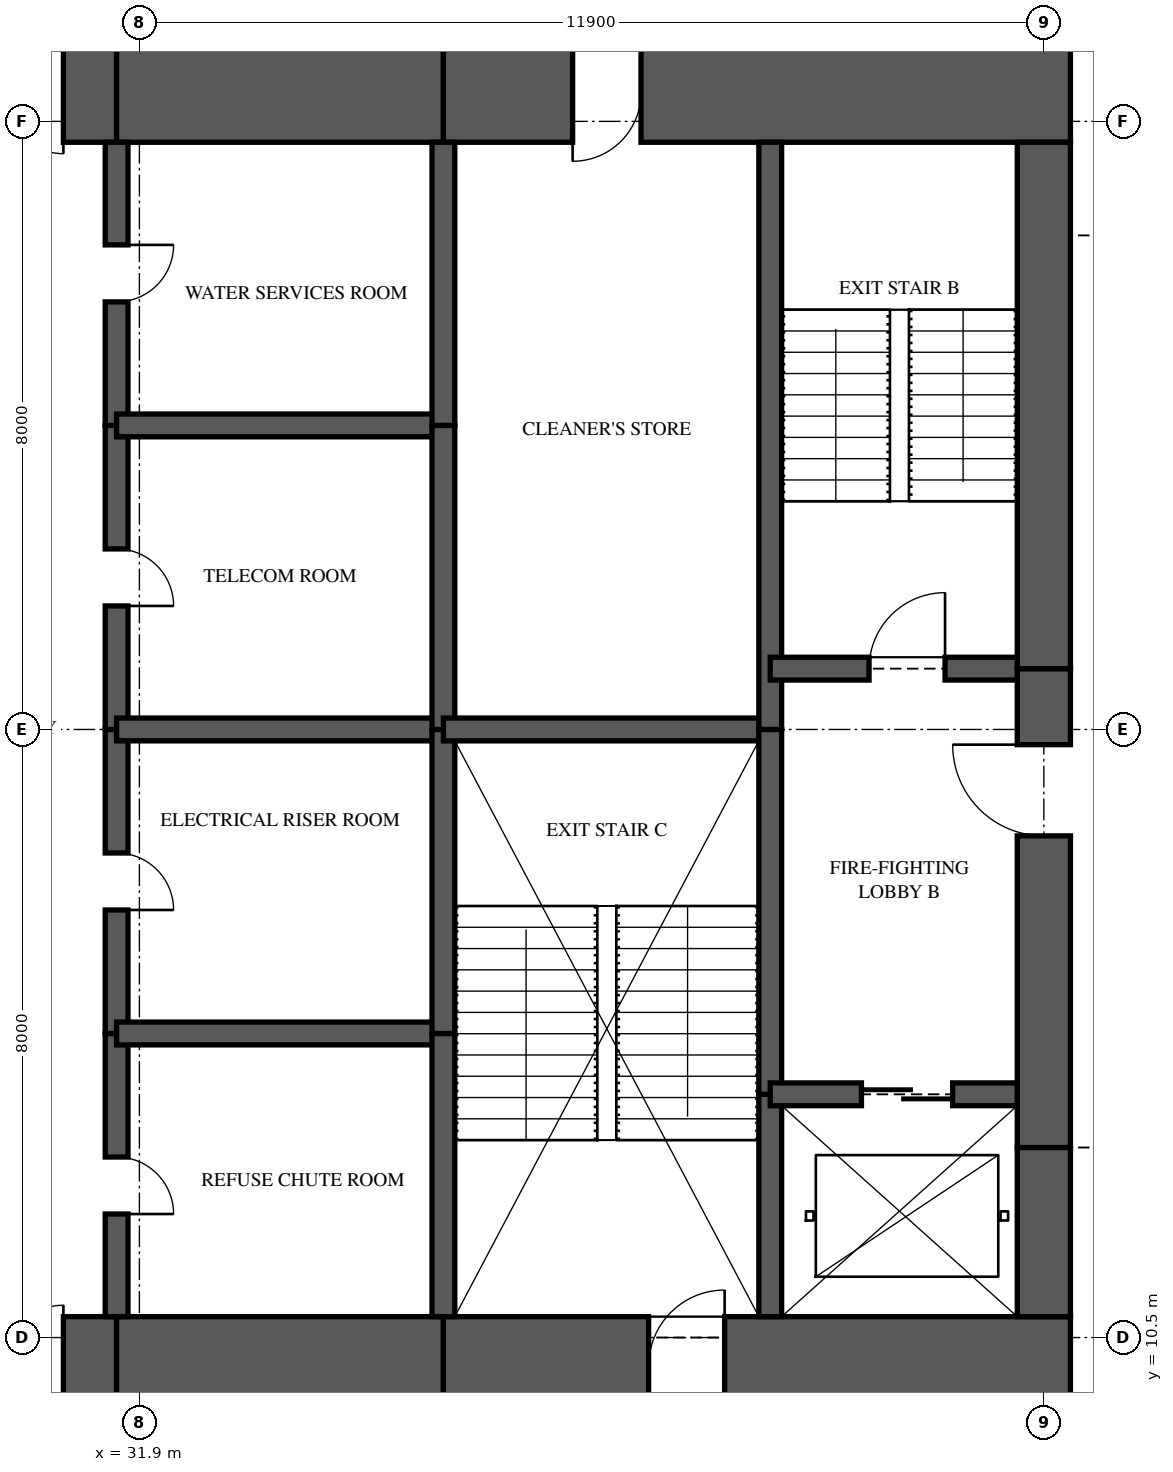
"""IFC4 building model, lengths in metres.
Left out: names, types, materials, properties, quantities, classifications, styles, units other than length and angle.
Written with IfcOpenShell. Run it as: python <this file> out.ifc"""

import sys

from ifc_helpers import new_model, si_unit, direction, frame, frame_2d, origin, place, context, subcontext, project, spatial, rectangle, extrude, element, fill, save


model = new_model("IFC4")
c1 = context("Model", 3, precision=1e-05, world=origin(), true_north=direction((0.0, 1.0)))
c2 = subcontext(c1, "Body", "Model", "MODEL_VIEW")
j1 = project(units=[si_unit("LENGTHUNIT", "METRE"), si_unit("PLANEANGLEUNIT", "RADIAN")], contexts=[c1])
p1 = place(None, origin())
s1 = spatial("IfcSite", under=j1, at=p1, CompositionType="ELEMENT")
p2 = place(p1, origin())
s2 = spatial("IfcBuilding", under=s1, at=p2, CompositionType="ELEMENT")
p3 = place(p2, frame((0.0, 0.0, 171.1)))
s3 = spatial("IfcBuildingStorey", under=s2, at=p3, CompositionType="ELEMENT", Elevation=171.1)
p4 = place(p3, frame((26.0, 10.125, 0.0), z_axis=(0.0, 0.0, 1.0), x_axis=(1.0, 0.0, 0.0)))
e1 = element("IfcWall", 1, at=p4, inside=s3, PredefinedType="SHEAR", context=c2, shape_type="SweptSolid", body=[
    extrude(rectangle(XDim=5.6, YDim=1.3, at=frame_2d((2.8, 0.0))), origin(), (0.0, 0.0, 1.0), 3.35),
])
p5 = place(p4, frame((3.3, 0.0, 0.0)))
e2 = element("IfcOpeningElement", 2, at=p5, cuts=e1, PredefinedType="OPENING", context=c2, shape_type="SweptSolid", body=[
    extrude(rectangle(XDim=1.6, YDim=2.1, at=frame_2d((0.8, 1.05))), frame((0.0, 0.66, 0.0), z_axis=(0.0, -1.0, 0.0), x_axis=(1.0, 0.0, 0.0)), (0.0, 0.0, 1.0), 1.32),
])
p6 = place(p3, frame((31.6, 10.125, 0.0), z_axis=(0.0, 0.0, 1.0), x_axis=(1.0, 0.0, 0.0)))
e3 = element("IfcWall", 3, at=p6, inside=s3, PredefinedType="SHEAR", context=c2, shape_type="SweptSolid", body=[
    extrude(rectangle(XDim=4.3, YDim=1.3, at=frame_2d((2.15, 0.0))), origin(), (0.0, 0.0, 1.0), 3.35),
])
p7 = place(p3, frame((35.9, 10.125, 0.0), z_axis=(0.0, 0.0, 1.0), x_axis=(1.0, 0.0, 0.0)))
e4 = element("IfcWall", 4, at=p7, inside=s3, PredefinedType="SHEAR", context=c2, shape_type="SweptSolid", body=[
    extrude(rectangle(XDim=8.25, YDim=1.3, at=frame_2d((4.125, 0.0))), origin(), (0.0, 0.0, 1.0), 3.35),
])
p8 = place(p7, frame((2.7, 0.0, 0.0)))
e5 = element("IfcOpeningElement", 5, at=p8, cuts=e4, PredefinedType="OPENING", context=c2, shape_type="SweptSolid", body=[
    extrude(rectangle(XDim=1.0, YDim=2.1, at=frame_2d((0.5, 1.05))), frame((0.0, 0.66, 0.0), z_axis=(0.0, -1.0, 0.0), x_axis=(1.0, 0.0, 0.0)), (0.0, 0.0, 1.0), 1.32),
])
p9 = place(p3, frame((44.15, 26.875, 0.0), z_axis=(0.0, 0.0, 1.0), x_axis=(-1.0, 0.0, 0.0)))
e6 = element("IfcWall", 6, at=p9, inside=s3, PredefinedType="SHEAR", context=c2, shape_type="SweptSolid", body=[
    extrude(rectangle(XDim=8.25, YDim=1.3, at=frame_2d((4.125, 0.0))), origin(), (0.0, 0.0, 1.0), 3.35),
])
p10 = place(p9, frame((5.65, 0.0, 0.0)))
e7 = element("IfcOpeningElement", 7, at=p10, cuts=e6, PredefinedType="OPENING", context=c2, shape_type="SweptSolid", body=[
    extrude(rectangle(XDim=0.9, YDim=2.1, at=frame_2d((0.45, 1.05))), frame((0.0, 0.66, 0.0), z_axis=(0.0, -1.0, 0.0), x_axis=(1.0, 0.0, 0.0)), (0.0, 0.0, 1.0), 1.32),
])
p11 = place(p3, frame((35.9, 26.875, 0.0), z_axis=(0.0, 0.0, 1.0), x_axis=(-1.0, 0.0, 0.0)))
e8 = element("IfcWall", 8, at=p11, inside=s3, PredefinedType="SHEAR", context=c2, shape_type="SweptSolid", body=[
    extrude(rectangle(XDim=4.3, YDim=1.3, at=frame_2d((2.15, 0.0))), origin(), (0.0, 0.0, 1.0), 3.35),
])
p12 = place(p3, frame((31.6, 26.875, 0.0), z_axis=(0.0, 0.0, 1.0), x_axis=(-1.0, 0.0, 0.0)))
e9 = element("IfcWall", 9, at=p12, inside=s3, PredefinedType="SHEAR", context=c2, shape_type="SweptSolid", body=[
    extrude(rectangle(XDim=5.6, YDim=1.3, at=frame_2d((2.8, 0.0))), origin(), (0.0, 0.0, 1.0), 3.35),
])
p13 = place(p12, frame((0.7, 0.0, 0.0)))
e10 = element("IfcOpeningElement", 10, at=p13, cuts=e9, PredefinedType="OPENING", context=c2, shape_type="SweptSolid", body=[
    extrude(rectangle(XDim=1.6, YDim=2.1, at=frame_2d((0.8, 1.05))), frame((0.0, 0.66, 0.0), z_axis=(0.0, -1.0, 0.0), x_axis=(1.0, 0.0, 0.0)), (0.0, 0.0, 1.0), 1.32),
])
p14 = place(p3, frame((43.8, 10.775, 0.0), z_axis=(0.0, 0.0, 1.0), x_axis=(0.0, 1.0, 0.0)))
e11 = element("IfcWall", 11, at=p14, inside=s3, PredefinedType="SHEAR", context=c2, shape_type="SweptSolid", body=[
    extrude(rectangle(XDim=2.225, YDim=0.7, at=frame_2d((1.113, 0.0))), origin(), (0.0, 0.0, 1.0), 3.35),
])
p15 = place(p3, frame((43.8, 13.0, 0.0), z_axis=(0.0, 0.0, 1.0), x_axis=(0.0, 1.0, 0.0)))
e12 = element("IfcWall", 12, at=p15, inside=s3, PredefinedType="SHEAR", context=c2, shape_type="SweptSolid", body=[
    extrude(rectangle(XDim=6.3, YDim=0.7, at=frame_2d((3.15, 0.0))), origin(), (0.0, 0.0, 1.0), 3.35),
])
p16 = place(p15, frame((4.1, 0.0, 0.0)))
e13 = element("IfcOpeningElement", 13, at=p16, cuts=e12, PredefinedType="OPENING", context=c2, shape_type="SweptSolid", body=[
    extrude(rectangle(XDim=1.2, YDim=2.2, at=frame_2d((0.6, 1.1))), frame((0.0, 0.36, 0.0), z_axis=(0.0, -1.0, 0.0), x_axis=(1.0, 0.0, 0.0)), (0.0, 0.0, 1.0), 0.72),
])
p17 = place(p3, frame((43.8, 19.3, 0.0), z_axis=(0.0, 0.0, 1.0), x_axis=(0.0, 1.0, 0.0)))
e14 = element("IfcWall", 14, at=p17, inside=s3, PredefinedType="SHEAR", context=c2, shape_type="SweptSolid", body=[
    extrude(rectangle(XDim=6.925, YDim=0.7, at=frame_2d((3.462, 0.0))), origin(), (0.0, 0.0, 1.0), 3.35),
])
p18 = place(p3, frame((31.6, 10.775, 0.0), z_axis=(0.0, 0.0, 1.0), x_axis=(0.0, 1.0, 0.0)))
e15 = element("IfcWall", 15, at=p18, inside=s3, PredefinedType="SHEAR", context=c2, shape_type="SweptSolid", body=[
    extrude(rectangle(XDim=3.725, YDim=0.3, at=frame_2d((1.863, 0.0))), origin(), (0.0, 0.0, 1.0), 3.35),
])
p19 = place(p18, frame((1.35, 0.0, 0.0)))
e16 = element("IfcOpeningElement", 16, at=p19, cuts=e15, PredefinedType="OPENING", context=c2, shape_type="SweptSolid", body=[
    extrude(rectangle(XDim=0.75, YDim=2.1, at=frame_2d((0.375, 1.05))), frame((0.0, 0.16, 0.0), z_axis=(0.0, -1.0, 0.0), x_axis=(1.0, 0.0, 0.0)), (0.0, 0.0, 1.0), 0.32),
])
p20 = place(p3, frame((31.6, 14.5, 0.0), z_axis=(0.0, 0.0, 1.0), x_axis=(0.0, 1.0, 0.0)))
e17 = element("IfcWall", 17, at=p20, inside=s3, PredefinedType="SHEAR", context=c2, shape_type="SweptSolid", body=[
    extrude(rectangle(XDim=4.0, YDim=0.3, at=frame_2d((2.0, 0.0))), origin(), (0.0, 0.0, 1.0), 3.35),
])
p21 = place(p20, frame((1.625, 0.0, 0.0)))
e18 = element("IfcOpeningElement", 18, at=p21, cuts=e17, PredefinedType="OPENING", context=c2, shape_type="SweptSolid", body=[
    extrude(rectangle(XDim=0.75, YDim=2.1, at=frame_2d((0.375, 1.05))), frame((0.0, 0.16, 0.0), z_axis=(0.0, -1.0, 0.0), x_axis=(1.0, 0.0, 0.0)), (0.0, 0.0, 1.0), 0.32),
])
p22 = place(p3, frame((31.6, 18.5, 0.0), z_axis=(0.0, 0.0, 1.0), x_axis=(0.0, 1.0, 0.0)))
e19 = element("IfcWall", 19, at=p22, inside=s3, PredefinedType="SHEAR", context=c2, shape_type="SweptSolid", body=[
    extrude(rectangle(XDim=4.0, YDim=0.3, at=frame_2d((2.0, 0.0))), origin(), (0.0, 0.0, 1.0), 3.35),
])
p23 = place(p22, frame((1.625, 0.0, 0.0)))
e20 = element("IfcOpeningElement", 20, at=p23, cuts=e19, PredefinedType="OPENING", context=c2, shape_type="SweptSolid", body=[
    extrude(rectangle(XDim=0.75, YDim=2.1, at=frame_2d((0.375, 1.05))), frame((0.0, 0.16, 0.0), z_axis=(0.0, -1.0, 0.0), x_axis=(1.0, 0.0, 0.0)), (0.0, 0.0, 1.0), 0.32),
])
p24 = place(p3, frame((31.6, 22.5, 0.0), z_axis=(0.0, 0.0, 1.0), x_axis=(0.0, 1.0, 0.0)))
e21 = element("IfcWall", 21, at=p24, inside=s3, PredefinedType="SHEAR", context=c2, shape_type="SweptSolid", body=[
    extrude(rectangle(XDim=3.725, YDim=0.3, at=frame_2d((1.863, 0.0))), origin(), (0.0, 0.0, 1.0), 3.35),
])
p25 = place(p24, frame((1.625, 0.0, 0.0)))
e22 = element("IfcOpeningElement", 22, at=p25, cuts=e21, PredefinedType="OPENING", context=c2, shape_type="SweptSolid", body=[
    extrude(rectangle(XDim=0.75, YDim=2.1, at=frame_2d((0.375, 1.05))), frame((0.0, 0.16, 0.0), z_axis=(0.0, -1.0, 0.0), x_axis=(1.0, 0.0, 0.0)), (0.0, 0.0, 1.0), 0.32),
])
p26 = place(p3, frame((35.9, 10.775, 0.0), z_axis=(0.0, 0.0, 1.0), x_axis=(0.0, 1.0, 0.0)))
e23 = element("IfcWall", 23, at=p26, inside=s3, PredefinedType="SHEAR", context=c2, shape_type="SweptSolid", body=[
    extrude(rectangle(XDim=3.725, YDim=0.3, at=frame_2d((1.863, 0.0))), origin(), (0.0, 0.0, 1.0), 3.35),
])
for number, where, z_axis, x_axis in (
    (24, (35.9, 14.5, 0.0), (0.0, 0.0, 1.0), (0.0, 1.0, 0.0)),
    (25, (35.9, 18.5, 0.0), (0.0, 0.0, 1.0), (0.0, 1.0, 0.0)),
):
    element("IfcWall", number, at=place(p3, frame(where, z_axis=z_axis, x_axis=x_axis)), inside=s3, PredefinedType="SHEAR", context=c2, shape_type="SweptSolid", body=[
        extrude(rectangle(XDim=4.0, YDim=0.3, at=frame_2d((2.0, 0.0))), origin(), (0.0, 0.0, 1.0), 3.35),
    ])
p27 = place(p3, frame((35.9, 22.5, 0.0), z_axis=(0.0, 0.0, 1.0), x_axis=(0.0, 1.0, 0.0)))
e26 = element("IfcWall", 26, at=p27, inside=s3, PredefinedType="SHEAR", context=c2, shape_type="SweptSolid", body=[
    extrude(rectangle(XDim=3.725, YDim=0.3, at=frame_2d((1.863, 0.0))), origin(), (0.0, 0.0, 1.0), 3.35),
])
p28 = place(p3, frame((40.2, 10.775, 0.0), z_axis=(0.0, 0.0, 1.0), x_axis=(0.0, 1.0, 0.0)))
e27 = element("IfcWall", 27, at=p28, inside=s3, PredefinedType="SHEAR", context=c2, shape_type="SweptSolid", body=[
    extrude(rectangle(XDim=2.925, YDim=0.3, at=frame_2d((1.462, 0.0))), origin(), (0.0, 0.0, 1.0), 3.35),
])
p29 = place(p3, frame((40.2, 13.7, 0.0), z_axis=(0.0, 0.0, 1.0), x_axis=(0.0, 1.0, 0.0)))
e28 = element("IfcWall", 28, at=p29, inside=s3, PredefinedType="SHEAR", context=c2, shape_type="SweptSolid", body=[
    extrude(rectangle(XDim=4.8, YDim=0.3, at=frame_2d((2.4, 0.0))), origin(), (0.0, 0.0, 1.0), 3.35),
])
p30 = place(p3, frame((40.2, 18.5, 0.0), z_axis=(0.0, 0.0, 1.0), x_axis=(0.0, 1.0, 0.0)))
e29 = element("IfcWall", 29, at=p30, inside=s3, PredefinedType="SHEAR", context=c2, shape_type="SweptSolid", body=[
    extrude(rectangle(XDim=7.725, YDim=0.3, at=frame_2d((3.863, 0.0))), origin(), (0.0, 0.0, 1.0), 3.35),
])
for number, where, z_axis, x_axis in (
    (30, (31.6, 14.5, 0.0), (0.0, 0.0, 1.0), (1.0, 0.0, 0.0)),
    (31, (31.6, 18.5, 0.0), (0.0, 0.0, 1.0), (1.0, 0.0, 0.0)),
    (32, (31.6, 22.5, 0.0), (0.0, 0.0, 1.0), (1.0, 0.0, 0.0)),
):
    element("IfcWall", number, at=place(p3, frame(where, z_axis=z_axis, x_axis=x_axis)), inside=s3, PredefinedType="SHEAR", context=c2, shape_type="SweptSolid", body=[
        extrude(rectangle(XDim=4.3, YDim=0.3, at=frame_2d((2.15, 0.0))), origin(), (0.0, 0.0, 1.0), 3.35),
    ])
p31 = place(p3, frame((35.9, 18.5, 0.0), z_axis=(0.0, 0.0, 1.0), x_axis=(1.0, 0.0, 0.0)))
e33 = element("IfcWall", 33, at=p31, inside=s3, PredefinedType="SHEAR", context=c2, shape_type="SweptSolid", body=[
    extrude(rectangle(XDim=4.3, YDim=0.3, at=frame_2d((2.15, 0.0))), origin(), (0.0, 0.0, 1.0), 3.35),
])
p32 = place(p3, frame((40.2, 13.7, 0.0), z_axis=(0.0, 0.0, 1.0), x_axis=(1.0, 0.0, 0.0)))
e34 = element("IfcWall", 34, at=p32, inside=s3, PredefinedType="SHEAR", context=c2, shape_type="SweptSolid", body=[
    extrude(rectangle(XDim=3.6, YDim=0.3, at=frame_2d((1.8, 0.0))), origin(), (0.0, 0.0, 1.0), 3.35),
])
p33 = place(p32, frame((1.2, 0.0, 0.0)))
e35 = element("IfcOpeningElement", 35, at=p33, cuts=e34, PredefinedType="OPENING", context=c2, shape_type="SweptSolid", body=[
    extrude(rectangle(XDim=1.2, YDim=2.1, at=frame_2d((0.6, 1.05))), frame((0.0, 0.16, 0.0), z_axis=(0.0, -1.0, 0.0), x_axis=(1.0, 0.0, 0.0)), (0.0, 0.0, 1.0), 0.32),
])
p34 = place(p3, frame((40.2, 19.3, 0.0), z_axis=(0.0, 0.0, 1.0), x_axis=(1.0, 0.0, 0.0)))
e36 = element("IfcWall", 36, at=p34, inside=s3, PredefinedType="SHEAR", context=c2, shape_type="SweptSolid", body=[
    extrude(rectangle(XDim=3.6, YDim=0.3, at=frame_2d((1.8, 0.0))), origin(), (0.0, 0.0, 1.0), 3.35),
])
p35 = place(p34, frame((1.3, 0.0, 0.0)))
e37 = element("IfcOpeningElement", 37, at=p35, cuts=e36, PredefinedType="OPENING", context=c2, shape_type="SweptSolid", body=[
    extrude(rectangle(XDim=1.0, YDim=2.1, at=frame_2d((0.5, 1.05))), frame((0.0, 0.16, 0.0), z_axis=(0.0, -1.0, 0.0), x_axis=(1.0, 0.0, 0.0)), (0.0, 0.0, 1.0), 0.32),
])
p36 = place(p35, origin())
e38 = element("IfcDoor", 38, at=p36, inside=s3, OperationType="SINGLE_SWING_RIGHT", PredefinedType="DOOR", context=c2, shape_type="SweptSolid", body=[
    extrude(rectangle(XDim=1.0, YDim=2.1, at=frame_2d((0.5, 1.05))), frame((0.0, 0.025, 0.0), z_axis=(0.0, -1.0, 0.0), x_axis=(1.0, 0.0, 0.0)), (0.0, 0.0, 1.0), 0.05),
])
fill(e37, e38)
p37 = place(p16, origin())
e39 = element("IfcDoor", 39, at=p37, inside=s3, OperationType="SINGLE_SWING_RIGHT", PredefinedType="DOOR", context=c2, shape_type="SweptSolid", body=[
    extrude(rectangle(XDim=1.2, YDim=2.2, at=frame_2d((0.6, 1.1))), frame((0.0, 0.025, 0.0), z_axis=(0.0, -1.0, 0.0), x_axis=(1.0, 0.0, 0.0)), (0.0, 0.0, 1.0), 0.05),
])
fill(e13, e39)
p38 = place(p33, origin())
e40 = element("IfcDoor", 40, at=p38, inside=s3, OperationType="SLIDING_TO_LEFT", PredefinedType="DOOR", context=c2, shape_type="SweptSolid", body=[
    extrude(rectangle(XDim=1.2, YDim=2.1, at=frame_2d((0.6, 1.05))), frame((0.0, 0.025, 0.0), z_axis=(0.0, -1.0, 0.0), x_axis=(1.0, 0.0, 0.0)), (0.0, 0.0, 1.0), 0.05),
])
fill(e35, e40)
p39 = place(p5, origin())
e41 = element("IfcDoor", 41, at=p39, inside=s3, OperationType="DOUBLE_DOOR_SINGLE_SWING", PredefinedType="DOOR", context=c2, shape_type="SweptSolid", body=[
    extrude(rectangle(XDim=1.6, YDim=2.1, at=frame_2d((0.8, 1.05))), frame((0.0, 0.025, 0.0), z_axis=(0.0, -1.0, 0.0), x_axis=(1.0, 0.0, 0.0)), (0.0, 0.0, 1.0), 0.05),
])
fill(e2, e41)
p40 = place(p13, origin())
e42 = element("IfcDoor", 42, at=p40, inside=s3, OperationType="DOUBLE_DOOR_SINGLE_SWING", PredefinedType="DOOR", context=c2, shape_type="SweptSolid", body=[
    extrude(rectangle(XDim=1.6, YDim=2.1, at=frame_2d((0.8, 1.05))), frame((0.0, 0.025, 0.0), z_axis=(0.0, -1.0, 0.0), x_axis=(1.0, 0.0, 0.0)), (0.0, 0.0, 1.0), 0.05),
])
fill(e10, e42)
p41 = place(p19, frame((0.75, 0.0, 0.0), z_axis=(0.0, 0.0, 1.0), x_axis=(-1.0, 0.0, 0.0)))
e43 = element("IfcDoor", 43, at=p41, inside=s3, OperationType="SINGLE_SWING_RIGHT", PredefinedType="DOOR", context=c2, shape_type="SweptSolid", body=[
    extrude(rectangle(XDim=0.75, YDim=2.1, at=frame_2d((0.375, 1.05))), frame((0.0, 0.025, 0.0), z_axis=(0.0, -1.0, 0.0), x_axis=(1.0, 0.0, 0.0)), (0.0, 0.0, 1.0), 0.05),
])
fill(e16, e43)
p42 = place(p21, frame((0.75, 0.0, 0.0), z_axis=(0.0, 0.0, 1.0), x_axis=(-1.0, 0.0, 0.0)))
e44 = element("IfcDoor", 44, at=p42, inside=s3, OperationType="SINGLE_SWING_RIGHT", PredefinedType="DOOR", context=c2, shape_type="SweptSolid", body=[
    extrude(rectangle(XDim=0.75, YDim=2.1, at=frame_2d((0.375, 1.05))), frame((0.0, 0.025, 0.0), z_axis=(0.0, -1.0, 0.0), x_axis=(1.0, 0.0, 0.0)), (0.0, 0.0, 1.0), 0.05),
])
fill(e18, e44)
p43 = place(p23, frame((0.75, 0.0, 0.0), z_axis=(0.0, 0.0, 1.0), x_axis=(-1.0, 0.0, 0.0)))
e45 = element("IfcDoor", 45, at=p43, inside=s3, OperationType="SINGLE_SWING_RIGHT", PredefinedType="DOOR", context=c2, shape_type="SweptSolid", body=[
    extrude(rectangle(XDim=0.75, YDim=2.1, at=frame_2d((0.375, 1.05))), frame((0.0, 0.025, 0.0), z_axis=(0.0, -1.0, 0.0), x_axis=(1.0, 0.0, 0.0)), (0.0, 0.0, 1.0), 0.05),
])
fill(e20, e45)
p44 = place(p25, frame((0.75, 0.0, 0.0), z_axis=(0.0, 0.0, 1.0), x_axis=(-1.0, 0.0, 0.0)))
e46 = element("IfcDoor", 46, at=p44, inside=s3, OperationType="SINGLE_SWING_LEFT", PredefinedType="DOOR", context=c2, shape_type="SweptSolid", body=[
    extrude(rectangle(XDim=0.75, YDim=2.1, at=frame_2d((0.375, 1.05))), frame((0.0, 0.025, 0.0), z_axis=(0.0, -1.0, 0.0), x_axis=(1.0, 0.0, 0.0)), (0.0, 0.0, 1.0), 0.05),
])
fill(e22, e46)
p45 = place(p8, origin())
e47 = element("IfcDoor", 47, at=p45, inside=s3, OperationType="SINGLE_SWING_RIGHT", PredefinedType="DOOR", context=c2, shape_type="SweptSolid", body=[
    extrude(rectangle(XDim=1.0, YDim=2.1, at=frame_2d((0.5, 1.05))), frame((0.0, 0.025, 0.0), z_axis=(0.0, -1.0, 0.0), x_axis=(1.0, 0.0, 0.0)), (0.0, 0.0, 1.0), 0.05),
])
fill(e5, e47)
p46 = place(p10, origin())
e48 = element("IfcDoor", 48, at=p46, inside=s3, OperationType="SINGLE_SWING_RIGHT", PredefinedType="DOOR", context=c2, shape_type="SweptSolid", body=[
    extrude(rectangle(XDim=0.9, YDim=2.1, at=frame_2d((0.45, 1.05))), frame((0.0, 0.47, 0.0), z_axis=(0.0, -1.0, 0.0), x_axis=(1.0, 0.0, 0.0)), (0.0, 0.0, 1.0), 0.8),
])
fill(e7, e48)
save(model, sys.argv[1])
